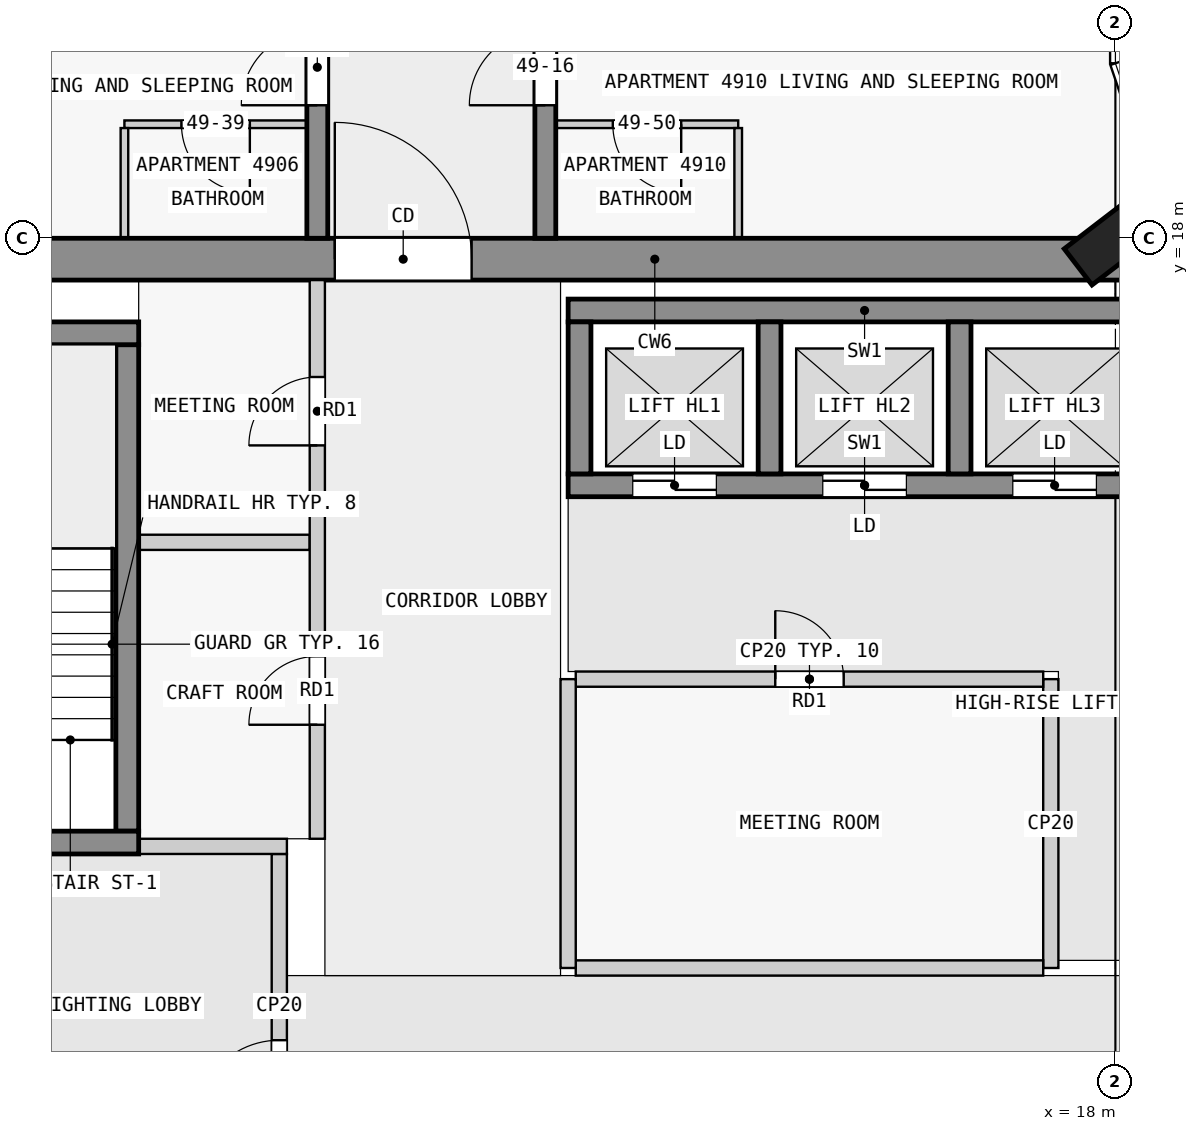
"""IFC4 building model, lengths in metres.
Left out: names, types, materials, properties, quantities, classifications, styles, units other than length and angle.
Written with IfcOpenShell. Run it as: python <this file> out.ifc"""

import sys

from ifc_helpers import new_model, si_unit, direction, frame, frame_2d, origin, origin_2d, place, context, subcontext, project, spatial, rectangle, extrude, element, fill, save


model = new_model("IFC4")
c1 = context("Model", 3, precision=1e-05, world=origin(), true_north=direction((0.0, 1.0)))
c2 = subcontext(c1, "Body", "Model", "MODEL_VIEW")
j1 = project(units=[si_unit("LENGTHUNIT", "METRE"), si_unit("PLANEANGLEUNIT", "RADIAN")], contexts=[c1])
p1 = place(None, origin())
s1 = spatial("IfcSite", under=j1, at=p1, CompositionType="ELEMENT")
p2 = place(p1, origin())
s2 = spatial("IfcBuilding", under=s1, at=p2, CompositionType="ELEMENT")
p3 = place(p2, frame((0.0, 0.0, 190.9)))
s3 = spatial("IfcBuildingStorey", under=s2, at=p3, CompositionType="ELEMENT", Elevation=190.9)
p4 = place(p3, frame((18.065, 18.05, 0.0), z_axis=(0.0, 0.0, 1.0), x_axis=(-0.608810846443, 0.793315418515, 0.0)))
e1 = element("IfcColumn", 1, at=p4, inside=s3, PredefinedType="COLUMN", context=c2, shape_type="SweptSolid", body=[
    extrude(rectangle(XDim=0.6, YDim=1.4, at=origin_2d()), origin(), (0.0, 0.0, 1.0), 3.5),
])
p5 = place(p3, frame((1.38, 17.725, 0.0), z_axis=(0.0, 0.0, 1.0), x_axis=(1.0, 0.0, 0.0)))
e2 = element("IfcWall", 2, at=p5, inside=s3, PredefinedType="SHEAR", context=c2, shape_type="SweptSolid", body=[
    extrude(rectangle(XDim=21.12, YDim=0.55, at=frame_2d((10.56, 0.0))), origin(), (0.0, 0.0, 1.0), 3.25),
])
p6 = place(p5, frame((6.35, 0.0, 0.0)))
e3 = element("IfcOpeningElement", 3, at=p6, cuts=e2, PredefinedType="OPENING", context=c2, shape_type="SweptSolid", body=[
    extrude(rectangle(XDim=1.8, YDim=2.1, at=frame_2d((0.9, 1.05))), frame((0.0, 0.285, 0.0), z_axis=(0.0, -1.0, 0.0), x_axis=(1.0, 0.0, 0.0)), (0.0, 0.0, 1.0), 0.57),
])
p7 = place(p3, frame((2.3, 10.05, 0.0), z_axis=(0.0, 0.0, 1.0), x_axis=(1.0, 0.0, 0.0)))
e4 = element("IfcWall", 4, at=p7, inside=s3, PredefinedType="SHEAR", context=c2, shape_type="SweptSolid", body=[
    extrude(rectangle(XDim=2.85, YDim=0.3, at=frame_2d((1.425, 0.0))), origin(), (0.0, 0.0, 1.0), 3.25),
])
p8 = place(p7, frame((0.25, 0.0, 0.0)))
e5 = element("IfcOpeningElement", 5, at=p8, cuts=e4, PredefinedType="OPENING", context=c2, shape_type="SweptSolid", body=[
    extrude(rectangle(XDim=1.1, YDim=2.1, at=frame_2d((0.55, 1.05))), frame((0.0, 0.16, 0.0), z_axis=(0.0, -1.0, 0.0), x_axis=(1.0, 0.0, 0.0)), (0.0, 0.0, 1.0), 0.32),
])
p9 = place(p3, frame((5.0, 10.2, 0.0), z_axis=(0.0, 0.0, 1.0), x_axis=(0.0, 1.0, 0.0)))
e6 = element("IfcWall", 6, at=p9, inside=s3, PredefinedType="SHEAR", context=c2, shape_type="SweptSolid", body=[
    extrude(rectangle(XDim=6.4, YDim=0.3, at=frame_2d((3.2, 0.0))), origin(), (0.0, 0.0, 1.0), 3.25),
])
p10 = place(p3, frame((2.3, 16.75, 0.0), z_axis=(0.0, 0.0, 1.0), x_axis=(1.0, 0.0, 0.0)))
e7 = element("IfcWall", 7, at=p10, inside=s3, PredefinedType="SHEAR", context=c2, shape_type="SweptSolid", body=[
    extrude(rectangle(XDim=2.85, YDim=0.3, at=frame_2d((1.425, 0.0))), origin(), (0.0, 0.0, 1.0), 3.25),
])
p11 = place(p3, frame((10.8, 17.05, 0.0), z_axis=(0.0, 0.0, 1.0), x_axis=(1.0, 0.0, 0.0)))
e8 = element("IfcWall", 8, at=p11, inside=s3, PredefinedType="SHEAR", context=c2, shape_type="SweptSolid", body=[
    extrude(rectangle(XDim=7.8, YDim=0.3, at=frame_2d((3.9, 0.0))), origin(), (0.0, 0.0, 1.0), 3.25),
])
p12 = place(p3, frame((10.8, 14.75, 0.0), z_axis=(0.0, 0.0, 1.0), x_axis=(1.0, 0.0, 0.0)))
e9 = element("IfcWall", 9, at=p12, inside=s3, PredefinedType="SHEAR", context=c2, shape_type="SweptSolid", body=[
    extrude(rectangle(XDim=7.8, YDim=0.3, at=frame_2d((3.9, 0.0))), origin(), (0.0, 0.0, 1.0), 3.25),
])
p13 = place(p12, frame((0.85, 0.0, 0.0)))
e10 = element("IfcOpeningElement", 10, at=p13, cuts=e9, PredefinedType="OPENING", context=c2, shape_type="SweptSolid", body=[
    extrude(rectangle(XDim=1.1, YDim=2.1, at=frame_2d((0.55, 1.05))), frame((0.0, 0.16, 0.0), z_axis=(0.0, -1.0, 0.0), x_axis=(1.0, 0.0, 0.0)), (0.0, 0.0, 1.0), 0.32),
])
p14 = place(p12, frame((3.35, 0.0, 0.0)))
e11 = element("IfcOpeningElement", 11, at=p14, cuts=e9, PredefinedType="OPENING", context=c2, shape_type="SweptSolid", body=[
    extrude(rectangle(XDim=1.1, YDim=2.1, at=frame_2d((0.55, 1.05))), frame((0.0, 0.16, 0.0), z_axis=(0.0, -1.0, 0.0), x_axis=(1.0, 0.0, 0.0)), (0.0, 0.0, 1.0), 0.32),
])
p15 = place(p12, frame((5.85, 0.0, 0.0)))
e12 = element("IfcOpeningElement", 12, at=p15, cuts=e9, PredefinedType="OPENING", context=c2, shape_type="SweptSolid", body=[
    extrude(rectangle(XDim=1.1, YDim=2.1, at=frame_2d((0.55, 1.05))), frame((0.0, 0.16, 0.0), z_axis=(0.0, -1.0, 0.0), x_axis=(1.0, 0.0, 0.0)), (0.0, 0.0, 1.0), 0.32),
])
for number, where, z_axis, x_axis in (
    (13, (10.95, 14.9, 0.0), (0.0, 0.0, 1.0), (0.0, 1.0, 0.0)),
    (14, (13.45, 14.9, 0.0), (0.0, 0.0, 1.0), (0.0, 1.0, 0.0)),
    (15, (15.95, 14.9, 0.0), (0.0, 0.0, 1.0), (0.0, 1.0, 0.0)),
):
    element("IfcWall", number, at=place(p3, frame(where, z_axis=z_axis, x_axis=x_axis)), inside=s3, PredefinedType="SHEAR", context=c2, shape_type="SweptSolid", body=[
        extrude(rectangle(XDim=2.0, YDim=0.3, at=frame_2d((1.0, 0.0))), origin(), (0.0, 0.0, 1.0), 3.25),
    ])
p16 = place(p3, frame((7.5, 18.0, 0.0), z_axis=(0.0, 0.0, 1.0), x_axis=(0.0, 1.0, 0.0)))
e16 = element("IfcWall", 16, at=p16, inside=s3, PredefinedType="SHEAR", context=c2, shape_type="SweptSolid", body=[
    extrude(rectangle(XDim=27.0, YDim=0.275, at=frame_2d((13.5, 0.0))), origin(), (0.0, 0.0, 1.0), 3.25),
])
p17 = place(p16, frame((1.75, 0.0, 0.0)))
e17 = element("IfcOpeningElement", 17, at=p17, cuts=e16, PredefinedType="OPENING", context=c2, shape_type="SweptSolid", body=[
    extrude(rectangle(XDim=1.0, YDim=2.1, at=frame_2d((0.5, 1.05))), frame((0.0, 0.147, 0.0), z_axis=(0.0, -1.0, 0.0), x_axis=(1.0, 0.0, 0.0)), (0.0, 0.0, 1.0), 0.295),
])
p18 = place(p16, frame((5.85, 0.0, 0.0)))
e18 = element("IfcOpeningElement", 18, at=p18, cuts=e16, PredefinedType="OPENING", context=c2, shape_type="SweptSolid", body=[
    extrude(rectangle(XDim=1.8, YDim=2.1, at=frame_2d((0.9, 1.05))), frame((0.0, 0.147, 0.0), z_axis=(0.0, -1.0, 0.0), x_axis=(1.0, 0.0, 0.0)), (0.0, 0.0, 1.0), 0.295),
])
p19 = place(p16, frame((10.75, 0.0, 0.0)))
e19 = element("IfcOpeningElement", 19, at=p19, cuts=e16, PredefinedType="OPENING", context=c2, shape_type="SweptSolid", body=[
    extrude(rectangle(XDim=1.0, YDim=2.1, at=frame_2d((0.5, 1.05))), frame((0.0, 0.147, 0.0), z_axis=(0.0, -1.0, 0.0), x_axis=(1.0, 0.0, 0.0)), (0.0, 0.0, 1.0), 0.295),
])
p20 = place(p16, frame((15.25, 0.0, 0.0)))
e20 = element("IfcOpeningElement", 20, at=p20, cuts=e16, PredefinedType="OPENING", context=c2, shape_type="SweptSolid", body=[
    extrude(rectangle(XDim=1.0, YDim=2.1, at=frame_2d((0.5, 1.05))), frame((0.0, 0.147, 0.0), z_axis=(0.0, -1.0, 0.0), x_axis=(1.0, 0.0, 0.0)), (0.0, 0.0, 1.0), 0.295),
])
p21 = place(p16, frame((21.35, 0.0, 0.0)))
e21 = element("IfcOpeningElement", 21, at=p21, cuts=e16, PredefinedType="OPENING", context=c2, shape_type="SweptSolid", body=[
    extrude(rectangle(XDim=1.0, YDim=2.1, at=frame_2d((0.5, 1.05))), frame((0.0, 0.147, 0.0), z_axis=(0.0, -1.0, 0.0), x_axis=(1.0, 0.0, 0.0)), (0.0, 0.0, 1.0), 0.295),
])
p22 = place(p3, frame((10.5, 18.0, 0.0), z_axis=(0.0, 0.0, 1.0), x_axis=(0.0, 1.0, 0.0)))
e22 = element("IfcWall", 22, at=p22, inside=s3, PredefinedType="SHEAR", context=c2, shape_type="SweptSolid", body=[
    extrude(rectangle(XDim=27.0, YDim=0.275, at=frame_2d((13.5, 0.0))), origin(), (0.0, 0.0, 1.0), 3.25),
])
p23 = place(p22, frame((1.75, 0.0, 0.0)))
e23 = element("IfcOpeningElement", 23, at=p23, cuts=e22, PredefinedType="OPENING", context=c2, shape_type="SweptSolid", body=[
    extrude(rectangle(XDim=1.0, YDim=2.1, at=frame_2d((0.5, 1.05))), frame((0.0, 0.147, 0.0), z_axis=(0.0, -1.0, 0.0), x_axis=(1.0, 0.0, 0.0)), (0.0, 0.0, 1.0), 0.295),
])
p24 = place(p22, frame((6.25, 0.0, 0.0)))
e24 = element("IfcOpeningElement", 24, at=p24, cuts=e22, PredefinedType="OPENING", context=c2, shape_type="SweptSolid", body=[
    extrude(rectangle(XDim=1.0, YDim=2.1, at=frame_2d((0.5, 1.05))), frame((0.0, 0.147, 0.0), z_axis=(0.0, -1.0, 0.0), x_axis=(1.0, 0.0, 0.0)), (0.0, 0.0, 1.0), 0.295),
])
p25 = place(p22, frame((15.25, 0.0, 0.0)))
e25 = element("IfcOpeningElement", 25, at=p25, cuts=e22, PredefinedType="OPENING", context=c2, shape_type="SweptSolid", body=[
    extrude(rectangle(XDim=1.0, YDim=2.1, at=frame_2d((0.5, 1.05))), frame((0.0, 0.147, 0.0), z_axis=(0.0, -1.0, 0.0), x_axis=(1.0, 0.0, 0.0)), (0.0, 0.0, 1.0), 0.295),
])
p26 = place(p22, frame((19.75, 0.0, 0.0)))
e26 = element("IfcOpeningElement", 26, at=p26, cuts=e22, PredefinedType="OPENING", context=c2, shape_type="SweptSolid", body=[
    extrude(rectangle(XDim=1.0, YDim=2.1, at=frame_2d((0.5, 1.05))), frame((0.0, 0.147, 0.0), z_axis=(0.0, -1.0, 0.0), x_axis=(1.0, 0.0, 0.0)), (0.0, 0.0, 1.0), 0.295),
])
p27 = place(p22, frame((23.25, 0.0, 0.0)))
e27 = element("IfcOpeningElement", 27, at=p27, cuts=e22, PredefinedType="OPENING", context=c2, shape_type="SweptSolid", body=[
    extrude(rectangle(XDim=0.9, YDim=2.1, at=frame_2d((0.45, 1.05))), frame((0.0, 0.147, 0.0), z_axis=(0.0, -1.0, 0.0), x_axis=(1.0, 0.0, 0.0)), (0.0, 0.0, 1.0), 0.295),
])
p28 = place(p22, frame((25.45, 0.0, 0.0)))
e28 = element("IfcOpeningElement", 28, at=p28, cuts=e22, PredefinedType="OPENING", context=c2, shape_type="SweptSolid", body=[
    extrude(rectangle(XDim=1.0, YDim=2.1, at=frame_2d((0.5, 1.05))), frame((0.0, 0.147, 0.0), z_axis=(0.0, -1.0, 0.0), x_axis=(1.0, 0.0, 0.0)), (0.0, 0.0, 1.0), 0.295),
])
p29 = place(p3, frame((7.0, 5.9, 0.0), z_axis=(0.0, 0.0, 1.0), x_axis=(0.0, 1.0, 0.0)))
e29 = element("IfcWall", 29, at=p29, inside=s3, PredefinedType="PARTITIONING", context=c2, shape_type="SweptSolid", body=[
    extrude(rectangle(XDim=4.0, YDim=0.2, at=frame_2d((2.0, 0.0))), origin(), (0.0, 0.0, 1.0), 3.25),
])
p30 = place(p29, frame((0.45, 0.0, 0.0)))
e30 = element("IfcOpeningElement", 30, at=p30, cuts=e29, PredefinedType="OPENING", context=c2, shape_type="SweptSolid", body=[
    extrude(rectangle(XDim=1.1, YDim=2.1, at=frame_2d((0.55, 1.05))), frame((0.0, 0.11, 0.0), z_axis=(0.0, -1.0, 0.0), x_axis=(1.0, 0.0, 0.0)), (0.0, 0.0, 1.0), 0.22),
])
p31 = place(p3, frame((5.15, 10.0, 0.0), z_axis=(0.0, 0.0, 1.0), x_axis=(1.0, 0.0, 0.0)))
e31 = element("IfcWall", 31, at=p31, inside=s3, PredefinedType="PARTITIONING", context=c2, shape_type="SweptSolid", body=[
    extrude(rectangle(XDim=1.95, YDim=0.2, at=frame_2d((0.975, 0.0))), origin(), (0.0, 0.0, 1.0), 3.25),
])
p32 = place(p3, frame((10.8, 8.4, 0.0), z_axis=(0.0, 0.0, 1.0), x_axis=(0.0, 1.0, 0.0)))
e32 = element("IfcWall", 32, at=p32, inside=s3, PredefinedType="PARTITIONING", context=c2, shape_type="SweptSolid", body=[
    extrude(rectangle(XDim=3.8, YDim=0.2, at=frame_2d((1.9, 0.0))), origin(), (0.0, 0.0, 1.0), 3.25),
])
p33 = place(p3, frame((10.9, 8.4, 0.0), z_axis=(0.0, 0.0, 1.0), x_axis=(1.0, 0.0, 0.0)))
e33 = element("IfcWall", 33, at=p33, inside=s3, PredefinedType="PARTITIONING", context=c2, shape_type="SweptSolid", body=[
    extrude(rectangle(XDim=6.15, YDim=0.2, at=frame_2d((3.075, 0.0))), origin(), (0.0, 0.0, 1.0), 3.25),
])
p34 = place(p3, frame((17.15, 8.4, 0.0), z_axis=(0.0, 0.0, 1.0), x_axis=(0.0, 1.0, 0.0)))
e34 = element("IfcWall", 34, at=p34, inside=s3, PredefinedType="PARTITIONING", context=c2, shape_type="SweptSolid", body=[
    extrude(rectangle(XDim=3.8, YDim=0.2, at=frame_2d((1.9, 0.0))), origin(), (0.0, 0.0, 1.0), 3.25),
])
p35 = place(p3, frame((10.9, 12.2, 0.0), z_axis=(0.0, 0.0, 1.0), x_axis=(1.0, 0.0, 0.0)))
e35 = element("IfcWall", 35, at=p35, inside=s3, PredefinedType="PARTITIONING", context=c2, shape_type="SweptSolid", body=[
    extrude(rectangle(XDim=6.15, YDim=0.2, at=frame_2d((3.075, 0.0))), origin(), (0.0, 0.0, 1.0), 3.25),
])
p36 = place(p35, frame((2.625, 0.0, 0.0)))
e36 = element("IfcOpeningElement", 36, at=p36, cuts=e35, PredefinedType="OPENING", context=c2, shape_type="SweptSolid", body=[
    extrude(rectangle(XDim=0.9, YDim=2.1, at=frame_2d((0.45, 1.05))), frame((0.0, 0.11, 0.0), z_axis=(0.0, -1.0, 0.0), x_axis=(1.0, 0.0, 0.0)), (0.0, 0.0, 1.0), 0.22),
])
p37 = place(p3, frame((7.5, 10.1, 0.0), z_axis=(0.0, 0.0, 1.0), x_axis=(0.0, 1.0, 0.0)))
e37 = element("IfcWall", 37, at=p37, inside=s3, PredefinedType="PARTITIONING", context=c2, shape_type="SweptSolid", body=[
    extrude(rectangle(XDim=7.35, YDim=0.2, at=frame_2d((3.675, 0.0))), origin(), (0.0, 0.0, 1.0), 3.25),
])
p38 = place(p37, frame((1.5, 0.0, 0.0)))
e38 = element("IfcOpeningElement", 38, at=p38, cuts=e37, PredefinedType="OPENING", context=c2, shape_type="SweptSolid", body=[
    extrude(rectangle(XDim=0.9, YDim=2.1, at=frame_2d((0.45, 1.05))), frame((0.0, 0.11, 0.0), z_axis=(0.0, -1.0, 0.0), x_axis=(1.0, 0.0, 0.0)), (0.0, 0.0, 1.0), 0.22),
])
p39 = place(p37, frame((5.175, 0.0, 0.0)))
e39 = element("IfcOpeningElement", 39, at=p39, cuts=e37, PredefinedType="OPENING", context=c2, shape_type="SweptSolid", body=[
    extrude(rectangle(XDim=0.9, YDim=2.1, at=frame_2d((0.45, 1.05))), frame((0.0, 0.11, 0.0), z_axis=(0.0, -1.0, 0.0), x_axis=(1.0, 0.0, 0.0)), (0.0, 0.0, 1.0), 0.22),
])
p40 = place(p3, frame((5.15, 14.0, 0.0), z_axis=(0.0, 0.0, 1.0), x_axis=(1.0, 0.0, 0.0)))
e40 = element("IfcWall", 40, at=p40, inside=s3, PredefinedType="PARTITIONING", context=c2, shape_type="SweptSolid", body=[
    extrude(rectangle(XDim=2.25, YDim=0.2, at=frame_2d((1.125, 0.0))), origin(), (0.0, 0.0, 1.0), 3.25),
])
p41 = place(p3, frame((7.363, 19.5, 0.0), z_axis=(0.0, 0.0, 1.0), x_axis=(-1.0, 0.0, 0.0)))
e41 = element("IfcWall", 41, at=p41, inside=s3, PredefinedType="PARTITIONING", context=c2, shape_type="SweptSolid", body=[
    extrude(rectangle(XDim=2.4, YDim=0.1, at=frame_2d((1.2, 0.0))), origin(), (0.0, 0.0, 1.0), 3.25),
])
p42 = place(p41, frame((0.75, 0.0, 0.0)))
e42 = element("IfcOpeningElement", 42, at=p42, cuts=e41, PredefinedType="OPENING", context=c2, shape_type="SweptSolid", body=[
    extrude(rectangle(XDim=0.9, YDim=2.1, at=frame_2d((0.45, 1.05))), frame((0.0, 0.06, 0.0), z_axis=(0.0, -1.0, 0.0), x_axis=(1.0, 0.0, 0.0)), (0.0, 0.0, 1.0), 0.12),
])
p43 = place(p3, frame((13.038, 19.5, 0.0), z_axis=(0.0, 0.0, 1.0), x_axis=(-1.0, 0.0, 0.0)))
e43 = element("IfcWall", 43, at=p43, inside=s3, PredefinedType="PARTITIONING", context=c2, shape_type="SweptSolid", body=[
    extrude(rectangle(XDim=2.4, YDim=0.1, at=frame_2d((1.2, 0.0))), origin(), (0.0, 0.0, 1.0), 3.25),
])
p44 = place(p43, frame((0.75, 0.0, 0.0)))
e44 = element("IfcOpeningElement", 44, at=p44, cuts=e43, PredefinedType="OPENING", context=c2, shape_type="SweptSolid", body=[
    extrude(rectangle(XDim=0.9, YDim=2.1, at=frame_2d((0.45, 1.05))), frame((0.0, 0.06, 0.0), z_axis=(0.0, -1.0, 0.0), x_axis=(1.0, 0.0, 0.0)), (0.0, 0.0, 1.0), 0.12),
])
for number, where, z_axis, x_axis in (
    (45, (4.962, 19.45, 0.0), (0.0, 0.0, 1.0), (0.0, -1.0, 0.0)),
    (46, (13.038, 18.0, 0.0), (0.0, 0.0, 1.0), (0.0, 1.0, 0.0)),
):
    element("IfcWall", number, at=place(p3, frame(where, z_axis=z_axis, x_axis=x_axis)), inside=s3, PredefinedType="PARTITIONING", context=c2, shape_type="SweptSolid", body=[
        extrude(rectangle(XDim=1.45, YDim=0.1, at=frame_2d((0.725, 0.0))), origin(), (0.0, 0.0, 1.0), 3.25),
    ])
p45 = place(p30, origin())
e47 = element("IfcDoor", 47, at=p45, inside=s3, OperationType="SINGLE_SWING_LEFT", PredefinedType="DOOR", context=c2, shape_type="SweptSolid", body=[
    extrude(rectangle(XDim=1.1, YDim=2.1, at=frame_2d((0.55, 1.05))), frame((0.0, 0.025, 0.0), z_axis=(0.0, -1.0, 0.0), x_axis=(1.0, 0.0, 0.0)), (0.0, 0.0, 1.0), 0.05),
])
fill(e30, e47)
p46 = place(p36, origin())
e48 = element("IfcDoor", 48, at=p46, inside=s3, OperationType="SINGLE_SWING_LEFT", PredefinedType="DOOR", context=c2, shape_type="SweptSolid", body=[
    extrude(rectangle(XDim=0.9, YDim=2.1, at=frame_2d((0.45, 1.05))), frame((0.0, 0.025, 0.0), z_axis=(0.0, -1.0, 0.0), x_axis=(1.0, 0.0, 0.0)), (0.0, 0.0, 1.0), 0.05),
])
fill(e36, e48)
p47 = place(p13, origin())
e49 = element("IfcDoor", 49, at=p47, inside=s3, OperationType="DOUBLE_DOOR_SLIDING", PredefinedType="DOOR", context=c2, shape_type="SweptSolid", body=[
    extrude(rectangle(XDim=1.1, YDim=2.1, at=frame_2d((0.55, 1.05))), frame((0.0, 0.025, 0.0), z_axis=(0.0, -1.0, 0.0), x_axis=(1.0, 0.0, 0.0)), (0.0, 0.0, 1.0), 0.05),
])
fill(e10, e49)
p48 = place(p14, origin())
e50 = element("IfcDoor", 50, at=p48, inside=s3, OperationType="DOUBLE_DOOR_SLIDING", PredefinedType="DOOR", context=c2, shape_type="SweptSolid", body=[
    extrude(rectangle(XDim=1.1, YDim=2.1, at=frame_2d((0.55, 1.05))), frame((0.0, 0.025, 0.0), z_axis=(0.0, -1.0, 0.0), x_axis=(1.0, 0.0, 0.0)), (0.0, 0.0, 1.0), 0.05),
])
fill(e11, e50)
p49 = place(p15, origin())
e51 = element("IfcDoor", 51, at=p49, inside=s3, OperationType="DOUBLE_DOOR_SLIDING", PredefinedType="DOOR", context=c2, shape_type="SweptSolid", body=[
    extrude(rectangle(XDim=1.1, YDim=2.1, at=frame_2d((0.55, 1.05))), frame((0.0, 0.025, 0.0), z_axis=(0.0, -1.0, 0.0), x_axis=(1.0, 0.0, 0.0)), (0.0, 0.0, 1.0), 0.05),
])
fill(e12, e51)
p50 = place(p6, origin())
e52 = element("IfcDoor", 52, at=p50, inside=s3, OperationType="DOUBLE_DOOR_SINGLE_SWING", PredefinedType="DOOR", context=c2, shape_type="SweptSolid", body=[
    extrude(rectangle(XDim=1.8, YDim=2.1, at=frame_2d((0.9, 1.05))), frame((0.0, 0.025, 0.0), z_axis=(0.0, -1.0, 0.0), x_axis=(1.0, 0.0, 0.0)), (0.0, 0.0, 1.0), 0.05),
])
fill(e3, e52)
p51 = place(p38, origin())
e53 = element("IfcDoor", 53, at=p51, inside=s3, OperationType="SINGLE_SWING_RIGHT", PredefinedType="DOOR", context=c2, shape_type="SweptSolid", body=[
    extrude(rectangle(XDim=0.9, YDim=2.1, at=frame_2d((0.45, 1.05))), frame((0.0, 0.025, 0.0), z_axis=(0.0, -1.0, 0.0), x_axis=(1.0, 0.0, 0.0)), (0.0, 0.0, 1.0), 0.05),
])
fill(e38, e53)
p52 = place(p39, origin())
e54 = element("IfcDoor", 54, at=p52, inside=s3, OperationType="SINGLE_SWING_RIGHT", PredefinedType="DOOR", context=c2, shape_type="SweptSolid", body=[
    extrude(rectangle(XDim=0.9, YDim=2.1, at=frame_2d((0.45, 1.05))), frame((0.0, 0.025, 0.0), z_axis=(0.0, -1.0, 0.0), x_axis=(1.0, 0.0, 0.0)), (0.0, 0.0, 1.0), 0.05),
])
fill(e39, e54)
p53 = place(p17, origin())
e55 = element("IfcDoor", 55, at=p53, inside=s3, OperationType="SINGLE_SWING_LEFT", PredefinedType="DOOR", context=c2, shape_type="SweptSolid", body=[
    extrude(rectangle(XDim=1.0, YDim=2.1, at=frame_2d((0.5, 1.05))), frame((0.0, 0.025, 0.0), z_axis=(0.0, -1.0, 0.0), x_axis=(1.0, 0.0, 0.0)), (0.0, 0.0, 1.0), 0.05),
])
fill(e17, e55)
p54 = place(p23, origin())
e56 = element("IfcDoor", 56, at=p54, inside=s3, OperationType="SINGLE_SWING_LEFT", PredefinedType="DOOR", context=c2, shape_type="SweptSolid", body=[
    extrude(rectangle(XDim=1.0, YDim=2.1, at=frame_2d((0.5, 1.05))), frame((0.0, 0.025, 0.0), z_axis=(0.0, -1.0, 0.0), x_axis=(1.0, 0.0, 0.0)), (0.0, 0.0, 1.0), 0.05),
])
fill(e23, e56)
p55 = place(p42, origin())
e57 = element("IfcDoor", 57, at=p55, inside=s3, OperationType="SINGLE_SWING_RIGHT", PredefinedType="DOOR", context=c2, shape_type="SweptSolid", body=[
    extrude(rectangle(XDim=0.9, YDim=2.1, at=frame_2d((0.45, 1.05))), frame((0.0, 0.025, 0.0), z_axis=(0.0, -1.0, 0.0), x_axis=(1.0, 0.0, 0.0)), (0.0, 0.0, 1.0), 0.05),
])
fill(e42, e57)
p56 = place(p44, origin())
e58 = element("IfcDoor", 58, at=p56, inside=s3, OperationType="SINGLE_SWING_LEFT", PredefinedType="DOOR", context=c2, shape_type="SweptSolid", body=[
    extrude(rectangle(XDim=0.9, YDim=2.1, at=frame_2d((0.45, 1.05))), frame((0.0, 0.025, 0.0), z_axis=(0.0, -1.0, 0.0), x_axis=(1.0, 0.0, 0.0)), (0.0, 0.0, 1.0), 0.05),
])
fill(e44, e58)
save(model, sys.argv[1])
